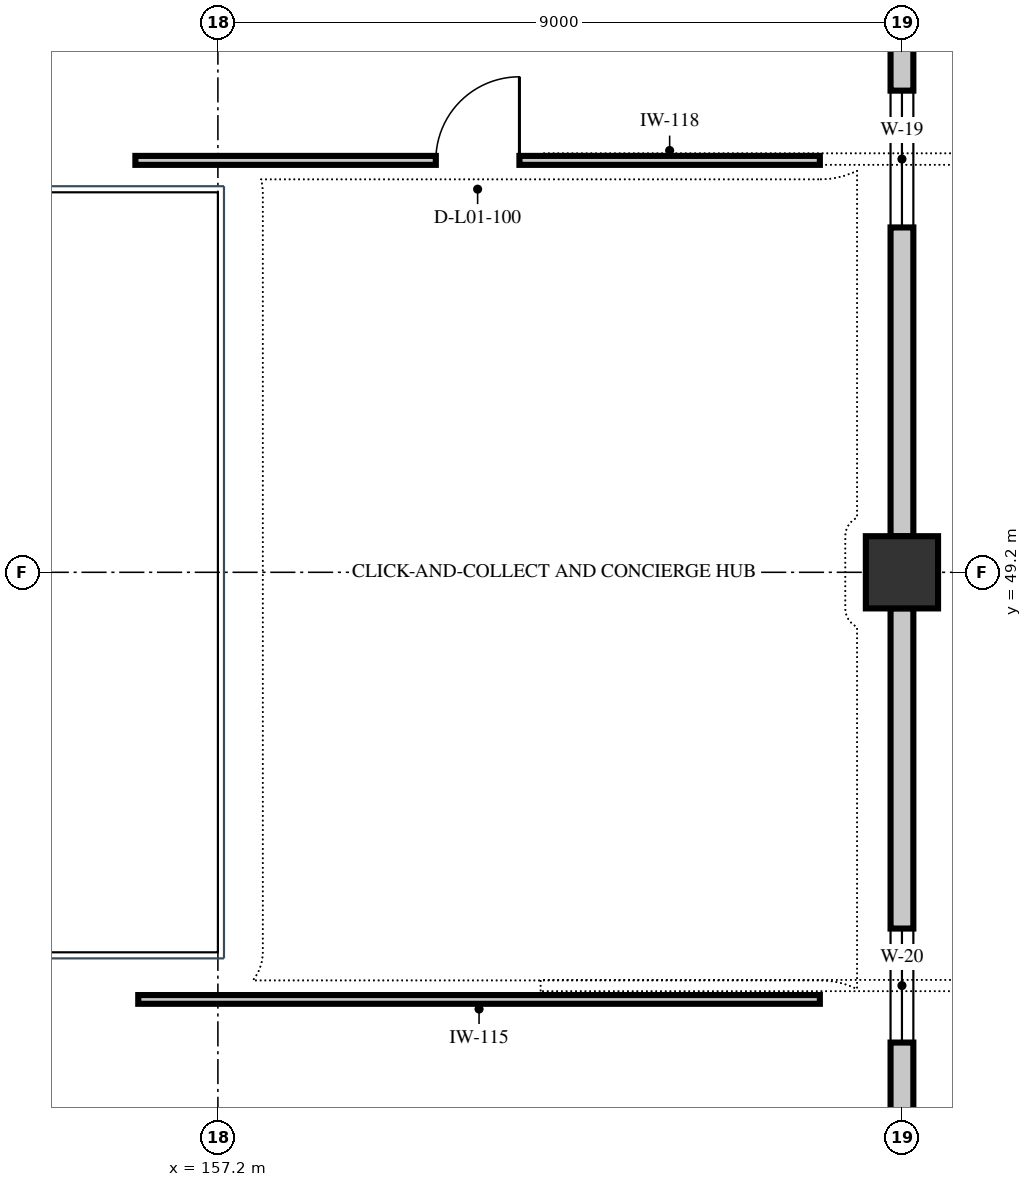
"""IFC4 building model, lengths in metres.
Left out: names, types, materials, properties, quantities, classifications, styles, units other than length and angle.
Written with IfcOpenShell. Run it as: python <this file> out.ifc"""

import sys

from ifc_helpers import new_model, si_unit, direction, frame, frame_2d, origin, origin_2d, place, context, subcontext, project, spatial, rectangle, extrude, element, fill, save


model = new_model("IFC4")
c1 = context("Model", 3, precision=1e-05, world=origin(), true_north=direction((0.0, 1.0)))
c2 = subcontext(c1, "Body", "Model", "MODEL_VIEW")
j1 = project(units=[si_unit("LENGTHUNIT", "METRE"), si_unit("PLANEANGLEUNIT", "RADIAN")], contexts=[c1])
p1 = place(None, origin())
s1 = spatial("IfcSite", under=j1, at=p1, CompositionType="ELEMENT")
p2 = place(p1, origin())
s2 = spatial("IfcBuilding", under=s1, at=p2, CompositionType="ELEMENT")
p3 = place(p2, frame((0.0, 0.0, 5.4)))
s3 = spatial("IfcBuildingStorey", under=s2, at=p3, CompositionType="ELEMENT", Elevation=5.4)
p4 = place(p3, frame((166.2, 49.2, 0.0), z_axis=(0.0, 0.0, 1.0), x_axis=(1.0, 0.0, 0.0)))
e1 = element("IfcColumn", 1, at=p4, inside=s3, PredefinedType="COLUMN", context=c2, shape_type="SweptSolid", body=[
    extrude(rectangle(XDim=0.95, YDim=0.95, at=origin_2d()), origin(), (0.0, 0.0, 1.0), 4.8),
])
p5 = place(p3, frame((166.2, 59.602, 0.0), z_axis=(0.0, 0.0, 1.0), x_axis=(0.0, -1.0, 0.0)))
e2 = element("IfcWall", 2, at=p5, inside=s3, PredefinedType="SOLIDWALL", context=c2, shape_type="SweptSolid", body=[
    extrude(rectangle(XDim=9.929, YDim=0.3, at=frame_2d((4.964, 0.0))), origin(), (0.0, 0.0, 1.0), 3.445),
])
p6 = place(p5, frame((4.064, 0.0, 1.2)))
e3 = element("IfcOpeningElement", 3, at=p6, cuts=e2, PredefinedType="OPENING", context=c2, shape_type="SweptSolid", body=[
    extrude(rectangle(XDim=1.8, YDim=1.5, at=frame_2d((0.9, 0.75))), frame((0.0, 0.162, 0.0), z_axis=(0.0, -1.0, 0.0), x_axis=(1.0, 0.0, 0.0)), (0.0, 0.0, 1.0), 0.324),
])
p7 = place(p3, frame((166.2, 48.727, 0.0), z_axis=(0.0, 0.0, 1.0), x_axis=(0.0, -1.0, 0.0)))
e4 = element("IfcWall", 4, at=p7, inside=s3, PredefinedType="SOLIDWALL", context=c2, shape_type="SweptSolid", body=[
    extrude(rectangle(XDim=9.929, YDim=0.3, at=frame_2d((4.964, 0.0))), origin(), (0.0, 0.0, 1.0), 3.445),
])
p8 = place(p7, frame((4.215, 0.0, 1.2)))
e5 = element("IfcOpeningElement", 5, at=p8, cuts=e4, PredefinedType="OPENING", context=c2, shape_type="SweptSolid", body=[
    extrude(rectangle(XDim=1.5, YDim=1.5, at=frame_2d((0.75, 0.75))), frame((0.0, 0.162, 0.0), z_axis=(0.0, -1.0, 0.0), x_axis=(1.0, 0.0, 0.0)), (0.0, 0.0, 1.0), 0.324),
])
p9 = place(p3, frame((156.115, 54.62, 0.0), z_axis=(0.0, 0.0, 1.0), x_axis=(1.0, 0.0, 0.0)))
e6 = element("IfcWall", 6, at=p9, inside=s3, PredefinedType="PARTITIONING", context=c2, shape_type="SweptSolid", body=[
    extrude(rectangle(XDim=9.006, YDim=0.118, at=frame_2d((4.503, 0.0))), origin(), (0.0, 0.0, 1.0), 4.505),
])
p10 = place(p9, frame((3.953, 0.0, 0.0)))
e7 = element("IfcOpeningElement", 7, at=p10, cuts=e6, PredefinedType="OPENING", context=c2, shape_type="SweptSolid", body=[
    extrude(rectangle(XDim=1.1, YDim=2.15, at=frame_2d((0.55, 1.075))), frame((0.0, 0.071, 0.0), z_axis=(0.0, -1.0, 0.0), x_axis=(1.0, 0.0, 0.0)), (0.0, 0.0, 1.0), 0.142),
])
p11 = place(p3, frame((165.12, 43.58, 0.0), z_axis=(0.0, 0.0, 1.0), x_axis=(-1.0, 0.0, 0.0)))
e8 = element("IfcWall", 8, at=p11, inside=s3, PredefinedType="PARTITIONING", context=c2, shape_type="SweptSolid", body=[
    extrude(rectangle(XDim=8.968, YDim=0.115, at=frame_2d((4.484, 0.0))), origin(), (0.0, 0.0, 1.0), 4.505),
])
p12 = place(p6, origin())
e9 = element("IfcWindow", 9, at=p12, inside=s3, PartitioningType="SINGLE_PANEL", PredefinedType="WINDOW", context=c2, shape_type="SweptSolid", body=[
    extrude(rectangle(XDim=1.8, YDim=1.5, at=frame_2d((0.9, 0.75))), frame((0.0, 0.03, 0.0), z_axis=(0.0, -1.0, 0.0), x_axis=(1.0, 0.0, 0.0)), (0.0, 0.0, 1.0), 0.06),
])
fill(e3, e9)
p13 = place(p8, origin())
e10 = element("IfcWindow", 10, at=p13, inside=s3, PartitioningType="SINGLE_PANEL", PredefinedType="WINDOW", context=c2, shape_type="SweptSolid", body=[
    extrude(rectangle(XDim=1.5, YDim=1.5, at=frame_2d((0.75, 0.75))), frame((0.0, 0.03, 0.0), z_axis=(0.0, -1.0, 0.0), x_axis=(1.0, 0.0, 0.0)), (0.0, 0.0, 1.0), 0.06),
])
fill(e5, e10)
p14 = place(p10, origin())
e11 = element("IfcDoor", 11, at=p14, inside=s3, OperationType="SINGLE_SWING_RIGHT", PredefinedType="DOOR", context=c2, shape_type="SweptSolid", body=[
    extrude(rectangle(XDim=1.1, YDim=2.15, at=frame_2d((0.55, 1.075))), frame((0.0, 0.025, 0.0), z_axis=(0.0, -1.0, 0.0), x_axis=(1.0, 0.0, 0.0)), (0.0, 0.0, 1.0), 0.05),
])
fill(e7, e11)
save(model, sys.argv[1])
